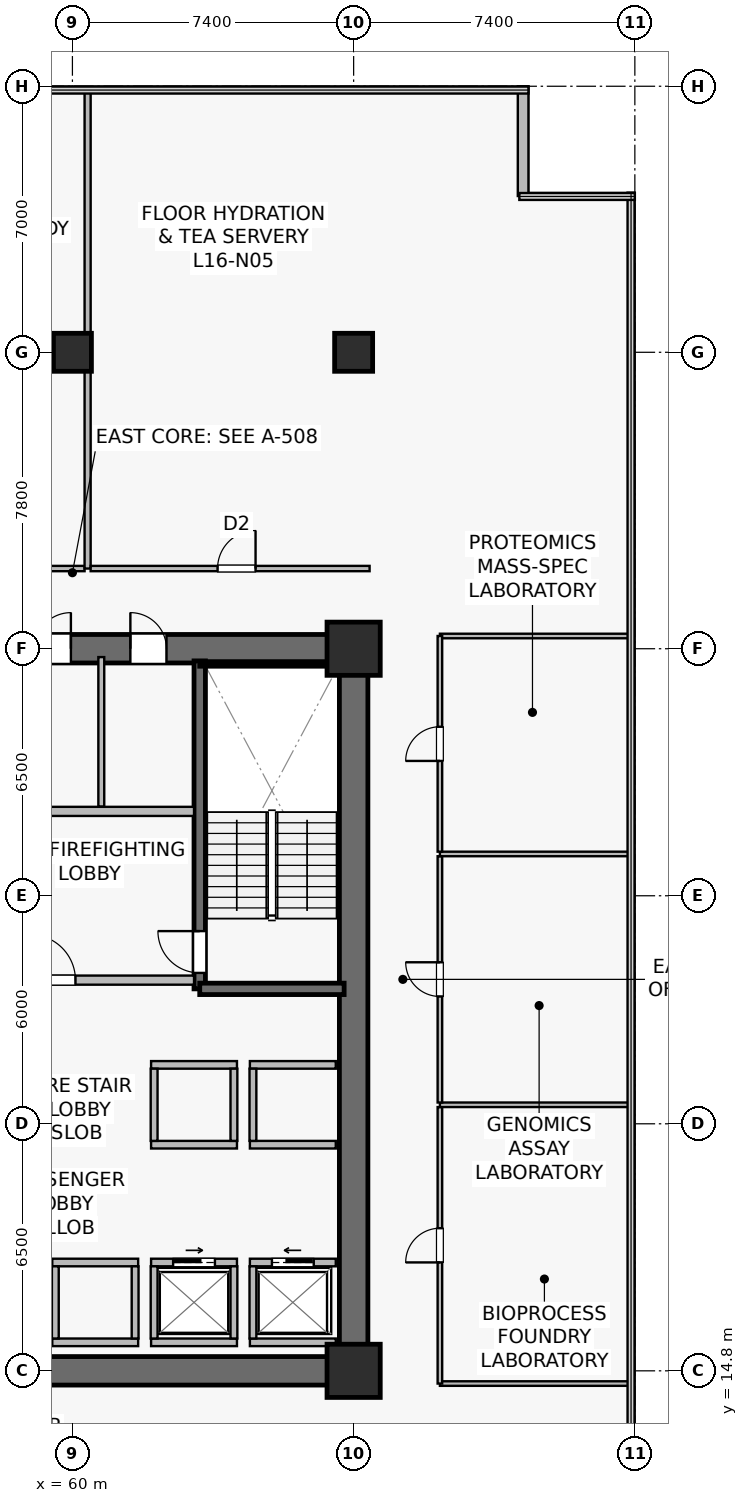
"""IFC4 building model, lengths in metres.
Left out: names, types, materials, properties, quantities, classifications, styles, units other than length and angle.
Written with IfcOpenShell. Run it as: python <this file> out.ifc"""

import sys

from ifc_helpers import new_model, si_unit, direction, frame, frame_2d, origin, origin_2d, place, context, subcontext, project, spatial, rectangle, extrude, source, transform, mapped, element, fill, save


model = new_model("IFC4")
c1 = context("Model", 3, precision=1e-05, world=origin(), true_north=direction((0.0, 1.0)))
c2 = subcontext(c1, "Body", "Model", "MODEL_VIEW")
j1 = project(units=[si_unit("LENGTHUNIT", "METRE"), si_unit("PLANEANGLEUNIT", "RADIAN")], contexts=[c1])
p1 = place(None, origin())
s1 = spatial("IfcSite", under=j1, at=p1, CompositionType="ELEMENT")
p2 = place(p1, origin())
s2 = spatial("IfcBuilding", under=s1, at=p2, CompositionType="ELEMENT")
p3 = place(p2, frame((0.0, 0.0, 66.2)))
s3 = spatial("IfcBuildingStorey", under=s2, at=p3, CompositionType="ELEMENT", Elevation=66.2)
p4 = place(p3, frame((52.225, 14.8, 0.0), z_axis=(0.0, 0.0, 1.0), x_axis=(1.0, 0.0, 0.0)))
e1 = element("IfcWall", 1, at=p4, inside=s3, PredefinedType="SHEAR", context=c2, shape_type="SweptSolid", body=[
    extrude(rectangle(XDim=15.55, YDim=0.75, at=frame_2d((7.775, 0.0))), origin(), (0.0, 0.0, 1.0), 3.78),
])
p5 = place(p3, frame((52.225, 33.8, 0.0), z_axis=(0.0, 0.0, 1.0), x_axis=(1.0, 0.0, 0.0)))
e2 = element("IfcWall", 2, at=p5, inside=s3, PredefinedType="SHEAR", context=c2, shape_type="SweptSolid", body=[
    extrude(rectangle(XDim=15.55, YDim=0.75, at=frame_2d((7.775, 0.0))), origin(), (0.0, 0.0, 1.0), 3.78),
])
p6 = place(p5, frame((9.3, 0.0, 0.0)))
e3 = element("IfcOpeningElement", 3, at=p6, cuts=e2, PredefinedType="OPENING", context=c2, shape_type="SweptSolid", body=[
    extrude(rectangle(XDim=0.95, YDim=2.15, at=frame_2d((0.475, 1.075))), frame((0.0, 0.385, 0.0), z_axis=(0.0, -1.0, 0.0), x_axis=(1.0, 0.0, 0.0)), (0.0, 0.0, 1.0), 0.77),
])
p7 = place(p5, frame((6.785, 0.0, 0.0)))
e4 = element("IfcOpeningElement", 4, at=p7, cuts=e2, PredefinedType="OPENING", context=c2, shape_type="SweptSolid", body=[
    extrude(rectangle(XDim=0.95, YDim=2.15, at=frame_2d((0.475, 1.075))), frame((0.0, 0.385, 0.0), z_axis=(0.0, -1.0, 0.0), x_axis=(1.0, 0.0, 0.0)), (0.0, 0.0, 1.0), 0.77),
])
p8 = place(p5, frame((4.235, 0.0, 0.0)))
e5 = element("IfcOpeningElement", 5, at=p8, cuts=e2, PredefinedType="OPENING", context=c2, shape_type="SweptSolid", body=[
    extrude(rectangle(XDim=0.95, YDim=2.15, at=frame_2d((0.475, 1.075))), frame((0.0, 0.385, 0.0), z_axis=(0.0, -1.0, 0.0), x_axis=(1.0, 0.0, 0.0)), (0.0, 0.0, 1.0), 0.77),
])
p9 = place(p5, frame((1.685, 0.0, 0.0)))
e6 = element("IfcOpeningElement", 6, at=p9, cuts=e2, PredefinedType="OPENING", context=c2, shape_type="SweptSolid", body=[
    extrude(rectangle(XDim=0.95, YDim=2.15, at=frame_2d((0.475, 1.075))), frame((0.0, 0.385, 0.0), z_axis=(0.0, -1.0, 0.0), x_axis=(1.0, 0.0, 0.0)), (0.0, 0.0, 1.0), 0.77),
])
p10 = place(p3, frame((67.4, 15.175, 0.0), z_axis=(0.0, 0.0, 1.0), x_axis=(0.0, 1.0, 0.0)))
e7 = element("IfcWall", 7, at=p10, inside=s3, PredefinedType="SHEAR", context=c2, shape_type="SweptSolid", body=[
    extrude(rectangle(XDim=18.25, YDim=0.75, at=frame_2d((9.125, 0.0))), origin(), (0.0, 0.0, 1.0), 3.78),
])
p11 = place(p3, frame((63.35, 24.85, 0.0), z_axis=(0.0, 0.0, 1.0), x_axis=(0.0, 1.0, 0.0)))
e8 = element("IfcWall", 8, at=p11, inside=s3, PredefinedType="SHEAR", context=c2, shape_type="SweptSolid", body=[
    extrude(rectangle(XDim=8.63, YDim=0.3, at=frame_2d((4.315, 0.0))), origin(), (0.0, 0.0, 1.0), 3.78),
])
p12 = place(p11, frame((0.42, 0.0, 0.0)))
e9 = element("IfcOpeningElement", 9, at=p12, cuts=e8, PredefinedType="OPENING", context=c2, shape_type="SweptSolid", body=[
    extrude(rectangle(XDim=1.1, YDim=2.15, at=frame_2d((0.55, 1.075))), frame((0.0, 0.16, 0.0), z_axis=(0.0, -1.0, 0.0), x_axis=(1.0, 0.0, 0.0)), (0.0, 0.0, 1.0), 0.32),
])
p13 = place(p3, frame((63.35, 24.85, 0.0), z_axis=(0.0, 0.0, 1.0), x_axis=(1.0, 0.0, 0.0)))
e10 = element("IfcWall", 10, at=p13, inside=s3, PredefinedType="SHEAR", context=c2, shape_type="SweptSolid", body=[
    extrude(rectangle(XDim=3.8, YDim=0.3, at=frame_2d((1.9, 0.0))), origin(), (0.0, 0.0, 1.0), 3.78),
])
p14 = place(p3, frame((63.35, 33.4, 0.0), z_axis=(0.0, 0.0, 1.0), x_axis=(1.0, 0.0, 0.0)))
e11 = element("IfcWall", 11, at=p14, inside=s3, PredefinedType="SOLIDWALL", context=c2, shape_type="SweptSolid", body=[
    extrude(rectangle(XDim=3.72, YDim=0.12, at=frame_2d((1.86, 0.0))), origin(), (0.0, 0.0, 1.0), 3.78),
])
m1 = source(origin(), c2, "Body", "SweptSolid", [
    extrude(rectangle(XDim=1.4, YDim=1.4, at=origin_2d()), origin(), (0.0, 0.0, 1.0), 4.1),
])
for number, where, z_axis, x_axis in (
    (12, (67.4, 14.8, 0.0), (0.0, 0.0, 1.0), (1.0, 0.0, 0.0)),
    (13, (67.4, 33.8, 0.0), (0.0, 0.0, 1.0), (1.0, 0.0, 0.0)),
):
    element("IfcColumn", number, at=place(p3, frame(where, z_axis=z_axis, x_axis=x_axis)), inside=s3, PredefinedType="COLUMN", context=c2, shape_type="MappedRepresentation", body=[
        mapped(m1, transform((0.0, 0.0, 0.0), scale=1.0)),
    ])
m2 = source(origin(), c2, "Body", "SweptSolid", [
    extrude(rectangle(XDim=1.0, YDim=1.0, at=origin_2d()), origin(), (0.0, 0.0, 1.0), 4.1),
])
for number, where, z_axis, x_axis in (
    (14, (60.0, 41.6, 0.0), (0.0, 0.0, 1.0), (1.0, 0.0, 0.0)),
    (15, (67.4, 41.6, 0.0), (0.0, 0.0, 1.0), (1.0, 0.0, 0.0)),
):
    element("IfcColumn", number, at=place(p3, frame(where, z_axis=z_axis, x_axis=x_axis)), inside=s3, PredefinedType="COLUMN", context=c2, shape_type="MappedRepresentation", body=[
        mapped(m2, transform((0.0, 0.0, 0.0), scale=1.0)),
    ])
p15 = place(p3, frame((71.86, 45.712, 0.0), z_axis=(0.0, 0.0, 1.0), x_axis=(0.0, 1.0, 0.0)))
e16 = element("IfcWall", 16, at=p15, inside=s3, PredefinedType="STANDARD", context=c2, shape_type="SweptSolid", body=[
    extrude(rectangle(XDim=2.888, YDim=0.28, at=frame_2d((1.444, 0.0))), origin(), (0.0, 0.0, 1.0), 3.78),
])
p16 = place(p3, frame((56.28, 25.08, 0.0), z_axis=(0.0, 0.0, 1.0), x_axis=(1.0, 0.0, 0.0)))
e17 = element("IfcWall", 17, at=p16, inside=s3, PredefinedType="SOLIDWALL", context=c2, shape_type="SweptSolid", body=[
    extrude(rectangle(XDim=6.92, YDim=0.24, at=frame_2d((3.46, 0.0))), origin(), (0.0, 0.0, 1.0), 3.115),
])
p17 = place(p16, frame((2.6, 0.0, 0.0)))
e18 = element("IfcOpeningElement", 18, at=p17, cuts=e17, PredefinedType="OPENING", context=c2, shape_type="SweptSolid", body=[
    extrude(rectangle(XDim=1.2, YDim=2.16, at=frame_2d((0.6, 1.08))), frame((0.0, 0.13, 0.0), z_axis=(0.0, -1.0, 0.0), x_axis=(1.0, 0.0, 0.0)), (0.0, 0.0, 1.0), 0.26),
])
p18 = place(p3, frame((56.28, 29.52, 0.0), z_axis=(0.0, 0.0, 1.0), x_axis=(1.0, 0.0, 0.0)))
e19 = element("IfcWall", 19, at=p18, inside=s3, PredefinedType="SOLIDWALL", context=c2, shape_type="SweptSolid", body=[
    extrude(rectangle(XDim=6.92, YDim=0.24, at=frame_2d((3.46, 0.0))), origin(), (0.0, 0.0, 1.0), 3.115),
])
p19 = place(p3, frame((64.67, 17.65, 0.0), z_axis=(0.0, 0.0, 1.0), x_axis=(1.0, 0.0, 0.0)))
e20 = element("IfcWall", 20, at=p19, inside=s3, PredefinedType="SOLIDWALL", context=c2, shape_type="SweptSolid", body=[
    extrude(rectangle(XDim=2.26, YDim=0.2, at=frame_2d((1.13, 0.0))), origin(), (0.0, 0.0, 1.0), 3.78),
])
p20 = place(p19, frame((0.58, 0.0, 0.0)))
e21 = element("IfcOpeningElement", 21, at=p20, cuts=e20, PredefinedType="OPENING", context=c2, shape_type="SweptSolid", body=[
    extrude(rectangle(XDim=1.1, YDim=2.22, at=frame_2d((0.55, 1.11))), frame((0.0, 0.11, 0.0), z_axis=(0.0, -1.0, 0.0), x_axis=(1.0, 0.0, 0.0)), (0.0, 0.0, 1.0), 0.22),
])
p21 = place(p3, frame((64.67, 15.55, 0.0), z_axis=(0.0, 0.0, 1.0), x_axis=(1.0, 0.0, 0.0)))
e22 = element("IfcWall", 22, at=p21, inside=s3, PredefinedType="SOLIDWALL", context=c2, shape_type="SweptSolid", body=[
    extrude(rectangle(XDim=2.26, YDim=0.2, at=frame_2d((1.13, 0.0))), origin(), (0.0, 0.0, 1.0), 3.78),
])
p22 = place(p3, frame((64.75, 15.65, 0.0), z_axis=(0.0, 0.0, 1.0), x_axis=(0.0, 1.0, 0.0)))
e23 = element("IfcWall", 23, at=p22, inside=s3, PredefinedType="SOLIDWALL", context=c2, shape_type="SweptSolid", body=[
    extrude(rectangle(XDim=1.9, YDim=0.18, at=frame_2d((0.95, 0.0))), origin(), (0.0, 0.0, 1.0), 3.78),
])
p23 = place(p3, frame((62.07, 17.65, 0.0), z_axis=(0.0, 0.0, 1.0), x_axis=(1.0, 0.0, 0.0)))
e24 = element("IfcWall", 24, at=p23, inside=s3, PredefinedType="SOLIDWALL", context=c2, shape_type="SweptSolid", body=[
    extrude(rectangle(XDim=2.26, YDim=0.2, at=frame_2d((1.13, 0.0))), origin(), (0.0, 0.0, 1.0), 3.78),
])
p24 = place(p23, frame((0.58, 0.0, 0.0)))
e25 = element("IfcOpeningElement", 25, at=p24, cuts=e24, PredefinedType="OPENING", context=c2, shape_type="SweptSolid", body=[
    extrude(rectangle(XDim=1.1, YDim=2.22, at=frame_2d((0.55, 1.11))), frame((0.0, 0.11, 0.0), z_axis=(0.0, -1.0, 0.0), x_axis=(1.0, 0.0, 0.0)), (0.0, 0.0, 1.0), 0.22),
])
p25 = place(p3, frame((62.07, 15.55, 0.0), z_axis=(0.0, 0.0, 1.0), x_axis=(1.0, 0.0, 0.0)))
e26 = element("IfcWall", 26, at=p25, inside=s3, PredefinedType="SOLIDWALL", context=c2, shape_type="SweptSolid", body=[
    extrude(rectangle(XDim=2.26, YDim=0.2, at=frame_2d((1.13, 0.0))), origin(), (0.0, 0.0, 1.0), 3.78),
])
for number, where, z_axis, x_axis in (
    (27, (62.15, 15.65, 0.0), (0.0, 0.0, 1.0), (0.0, 1.0, 0.0)),
    (28, (64.25, 15.65, 0.0), (0.0, 0.0, 1.0), (0.0, 1.0, 0.0)),
):
    element("IfcWall", number, at=place(p3, frame(where, z_axis=z_axis, x_axis=x_axis)), inside=s3, PredefinedType="SOLIDWALL", context=c2, shape_type="SweptSolid", body=[
        extrude(rectangle(XDim=1.9, YDim=0.18, at=frame_2d((0.95, 0.0))), origin(), (0.0, 0.0, 1.0), 3.78),
    ])
for number, where, z_axis, x_axis in (
    (29, (59.47, 17.65, 0.0), (0.0, 0.0, 1.0), (1.0, 0.0, 0.0)),
    (30, (59.47, 15.55, 0.0), (0.0, 0.0, 1.0), (1.0, 0.0, 0.0)),
):
    element("IfcWall", number, at=place(p3, frame(where, z_axis=z_axis, x_axis=x_axis)), inside=s3, PredefinedType="SOLIDWALL", context=c2, shape_type="SweptSolid", body=[
        extrude(rectangle(XDim=2.26, YDim=0.2, at=frame_2d((1.13, 0.0))), origin(), (0.0, 0.0, 1.0), 3.115),
    ])
for number, where, z_axis, x_axis in (
    (31, (59.55, 15.65, 0.0), (0.0, 0.0, 1.0), (0.0, 1.0, 0.0)),
    (32, (61.65, 15.65, 0.0), (0.0, 0.0, 1.0), (0.0, 1.0, 0.0)),
):
    element("IfcWall", number, at=place(p3, frame(where, z_axis=z_axis, x_axis=x_axis)), inside=s3, PredefinedType="SOLIDWALL", context=c2, shape_type="SweptSolid", body=[
        extrude(rectangle(XDim=1.9, YDim=0.18, at=frame_2d((0.95, 0.0))), origin(), (0.0, 0.0, 1.0), 3.78),
    ])
for number, where, z_axis, x_axis in (
    (33, (64.67, 20.75, 0.0), (0.0, 0.0, 1.0), (1.0, 0.0, 0.0)),
    (34, (64.67, 22.85, 0.0), (0.0, 0.0, 1.0), (1.0, 0.0, 0.0)),
):
    element("IfcWall", number, at=place(p3, frame(where, z_axis=z_axis, x_axis=x_axis)), inside=s3, PredefinedType="SOLIDWALL", context=c2, shape_type="SweptSolid", body=[
        extrude(rectangle(XDim=2.26, YDim=0.2, at=frame_2d((1.13, 0.0))), origin(), (0.0, 0.0, 1.0), 3.78),
    ])
p26 = place(p3, frame((64.75, 20.85, 0.0), z_axis=(0.0, 0.0, 1.0), x_axis=(0.0, 1.0, 0.0)))
e35 = element("IfcWall", 35, at=p26, inside=s3, PredefinedType="SOLIDWALL", context=c2, shape_type="SweptSolid", body=[
    extrude(rectangle(XDim=1.9, YDim=0.18, at=frame_2d((0.95, 0.0))), origin(), (0.0, 0.0, 1.0), 3.78),
])
for number, where, z_axis, x_axis in (
    (36, (62.07, 20.75, 0.0), (0.0, 0.0, 1.0), (1.0, 0.0, 0.0)),
    (37, (62.07, 22.85, 0.0), (0.0, 0.0, 1.0), (1.0, 0.0, 0.0)),
):
    element("IfcWall", number, at=place(p3, frame(where, z_axis=z_axis, x_axis=x_axis)), inside=s3, PredefinedType="SOLIDWALL", context=c2, shape_type="SweptSolid", body=[
        extrude(rectangle(XDim=2.26, YDim=0.2, at=frame_2d((1.13, 0.0))), origin(), (0.0, 0.0, 1.0), 3.78),
    ])
for number, where, z_axis, x_axis in (
    (38, (62.15, 20.85, 0.0), (0.0, 0.0, 1.0), (0.0, 1.0, 0.0)),
    (39, (64.25, 20.85, 0.0), (0.0, 0.0, 1.0), (0.0, 1.0, 0.0)),
):
    element("IfcWall", number, at=place(p3, frame(where, z_axis=z_axis, x_axis=x_axis)), inside=s3, PredefinedType="SOLIDWALL", context=c2, shape_type="SweptSolid", body=[
        extrude(rectangle(XDim=1.9, YDim=0.18, at=frame_2d((0.95, 0.0))), origin(), (0.0, 0.0, 1.0), 3.78),
    ])
p27 = place(p3, frame((60.76, 29.65, 0.0), z_axis=(0.0, 0.0, 1.0), x_axis=(0.0, 1.0, 0.0)))
e40 = element("IfcWall", 40, at=p27, inside=s3, PredefinedType="PLUMBINGWALL", context=c2, shape_type="SweptSolid", body=[
    extrude(rectangle(XDim=3.93, YDim=0.155, at=frame_2d((1.965, 0.0))), origin(), (0.0, 0.0, 1.0), 3.78),
])
p28 = place(p3, frame((45.08, 35.91, 0.0), z_axis=(0.0, 0.0, 1.0), x_axis=(1.0, 0.0, 0.0)))
e41 = element("IfcWall", 41, at=p28, inside=s3, PredefinedType="PARTITIONING", context=c2, shape_type="SweptSolid", body=[
    extrude(rectangle(XDim=15.24, YDim=0.14, at=frame_2d((7.62, 0.0))), origin(), (0.0, 0.0, 1.0), 3.115),
])
p29 = place(p28, frame((5.86, 0.0, 0.0)))
e42 = element("IfcOpeningElement", 42, at=p29, cuts=e41, PredefinedType="OPENING", context=c2, shape_type="SweptSolid", body=[
    extrude(rectangle(XDim=1.1, YDim=2.18, at=frame_2d((0.55, 1.09))), frame((0.0, 0.08, 0.0), z_axis=(0.0, -1.0, 0.0), x_axis=(1.0, 0.0, 0.0)), (0.0, 0.0, 1.0), 0.16),
])
p30 = place(p3, frame((60.4, 35.91, 0.0), z_axis=(0.0, 0.0, 1.0), x_axis=(0.0, 1.0, 0.0)))
e43 = element("IfcWall", 43, at=p30, inside=s3, PredefinedType="PARTITIONING", context=c2, shape_type="SweptSolid", body=[
    extrude(rectangle(XDim=12.58, YDim=0.16, at=frame_2d((6.29, 0.0))), origin(), (0.0, 0.0, 1.0), 3.015),
])
p31 = place(p3, frame((60.48, 35.91, 0.0), z_axis=(0.0, 0.0, 1.0), x_axis=(1.0, 0.0, 0.0)))
e44 = element("IfcWall", 44, at=p31, inside=s3, PredefinedType="PARTITIONING", context=c2, shape_type="SweptSolid", body=[
    extrude(rectangle(XDim=7.34, YDim=0.14, at=frame_2d((3.67, 0.0))), origin(), (0.0, 0.0, 1.0), 3.265),
])
p32 = place(p31, frame((3.339, 0.0, 0.0)))
e45 = element("IfcOpeningElement", 45, at=p32, cuts=e44, PredefinedType="OPENING", context=c2, shape_type="SweptSolid", body=[
    extrude(rectangle(XDim=1.0, YDim=2.15, at=frame_2d((0.5, 1.075))), frame((0.0, 0.08, 0.0), z_axis=(0.0, -1.0, 0.0), x_axis=(1.0, 0.0, 0.0)), (0.0, 0.0, 1.0), 0.16),
])
for number, where, z_axis, x_axis in (
    (46, (69.67, 14.465, 0.0), (0.0, 0.0, 1.0), (1.0, 0.0, 0.0)),
    (47, (69.67, 34.135, 0.0), (0.0, 0.0, 1.0), (1.0, 0.0, 0.0)),
):
    element("IfcWall", number, at=place(p3, frame(where, z_axis=z_axis, x_axis=x_axis)), inside=s3, PredefinedType="PARTITIONING", context=c2, shape_type="SweptSolid", body=[
        extrude(rectangle(XDim=5.02, YDim=0.12, at=frame_2d((2.51, 0.0))), origin(), (0.0, 0.0, 1.0), 3.78),
    ])
p33 = place(p3, frame((69.67, 14.465, 0.0), z_axis=(0.0, 0.0, 1.0), x_axis=(0.0, 1.0, 0.0)))
e48 = element("IfcWall", 48, at=p33, inside=s3, PredefinedType="PARTITIONING", context=c2, shape_type="SweptSolid", body=[
    extrude(rectangle(XDim=7.275, YDim=0.12, at=frame_2d((3.637, 0.0))), origin(), (0.0, 0.0, 1.0), 3.78),
])
p34 = place(p33, frame((3.188, 0.0, 0.0)))
e49 = element("IfcOpeningElement", 49, at=p34, cuts=e48, PredefinedType="OPENING", context=c2, shape_type="SweptSolid", body=[
    extrude(rectangle(XDim=0.9, YDim=2.1, at=frame_2d((0.45, 1.05))), frame((0.0, 0.07, 0.0), z_axis=(0.0, -1.0, 0.0), x_axis=(1.0, 0.0, 0.0)), (0.0, 0.0, 1.0), 0.14),
])
p35 = place(p3, frame((69.67, 21.8, 0.0), z_axis=(0.0, 0.0, 1.0), x_axis=(1.0, 0.0, 0.0)))
e50 = element("IfcWall", 50, at=p35, inside=s3, PredefinedType="PARTITIONING", context=c2, shape_type="SweptSolid", body=[
    extrude(rectangle(XDim=5.02, YDim=0.12, at=frame_2d((2.51, 0.0))), origin(), (0.0, 0.0, 1.0), 3.78),
])
p36 = place(p3, frame((69.67, 21.86, 0.0), z_axis=(0.0, 0.0, 1.0), x_axis=(0.0, 1.0, 0.0)))
e51 = element("IfcWall", 51, at=p36, inside=s3, PredefinedType="PARTITIONING", context=c2, shape_type="SweptSolid", body=[
    extrude(rectangle(XDim=6.48, YDim=0.12, at=frame_2d((3.24, 0.0))), origin(), (0.0, 0.0, 1.0), 3.78),
])
p37 = place(p36, frame((2.79, 0.0, 0.0)))
e52 = element("IfcOpeningElement", 52, at=p37, cuts=e51, PredefinedType="OPENING", context=c2, shape_type="SweptSolid", body=[
    extrude(rectangle(XDim=0.9, YDim=2.1, at=frame_2d((0.45, 1.05))), frame((0.0, 0.07, 0.0), z_axis=(0.0, -1.0, 0.0), x_axis=(1.0, 0.0, 0.0)), (0.0, 0.0, 1.0), 0.14),
])
p38 = place(p3, frame((69.67, 28.4, 0.0), z_axis=(0.0, 0.0, 1.0), x_axis=(1.0, 0.0, 0.0)))
e53 = element("IfcWall", 53, at=p38, inside=s3, PredefinedType="PARTITIONING", context=c2, shape_type="SweptSolid", body=[
    extrude(rectangle(XDim=5.02, YDim=0.12, at=frame_2d((2.51, 0.0))), origin(), (0.0, 0.0, 1.0), 3.78),
])
p39 = place(p3, frame((69.67, 28.46, 0.0), z_axis=(0.0, 0.0, 1.0), x_axis=(0.0, 1.0, 0.0)))
e54 = element("IfcWall", 54, at=p39, inside=s3, PredefinedType="PARTITIONING", context=c2, shape_type="SweptSolid", body=[
    extrude(rectangle(XDim=5.675, YDim=0.12, at=frame_2d((2.837, 0.0))), origin(), (0.0, 0.0, 1.0), 3.78),
])
p40 = place(p39, frame((2.387, 0.0, 0.0)))
e55 = element("IfcOpeningElement", 55, at=p40, cuts=e54, PredefinedType="OPENING", context=c2, shape_type="SweptSolid", body=[
    extrude(rectangle(XDim=0.9, YDim=2.1, at=frame_2d((0.45, 1.05))), frame((0.0, 0.07, 0.0), z_axis=(0.0, -1.0, 0.0), x_axis=(1.0, 0.0, 0.0)), (0.0, 0.0, 1.0), 0.14),
])
m3 = source(origin(), c2, "Body", "SweptSolid", [
    extrude(rectangle(XDim=1.1, YDim=2.15, at=frame_2d((0.55, 1.075))), frame((0.0, 0.025, 0.0), z_axis=(0.0, -1.0, 0.0), x_axis=(1.0, 0.0, 0.0)), (0.0, 0.0, 1.0), 0.05),
])
p41 = place(p12, origin())
e56 = element("IfcDoor", 56, at=p41, inside=s3, OperationType="SINGLE_SWING_RIGHT", PredefinedType="DOOR", context=c2, shape_type="MappedRepresentation", body=[
    mapped(m3, transform((0.0, 0.0, 0.0), scale=1.0)),
])
fill(e9, e56)
m4 = source(origin(), c2, "Body", "SweptSolid", [
    extrude(rectangle(XDim=1.2, YDim=2.16, at=frame_2d((0.6, 1.08))), frame((0.0, 0.025, 0.0), z_axis=(0.0, -1.0, 0.0), x_axis=(1.0, 0.0, 0.0)), (0.0, 0.0, 1.0), 0.05),
])
p42 = place(p17, origin())
e57 = element("IfcDoor", 57, at=p42, inside=s3, OperationType="SINGLE_SWING_LEFT", PredefinedType="DOOR", context=c2, shape_type="MappedRepresentation", body=[
    mapped(m4, transform((0.0, 0.0, 0.0), scale=1.0)),
])
fill(e18, e57)
m5 = source(origin(), c2, "Body", "SweptSolid", [
    extrude(rectangle(XDim=1.1, YDim=2.22, at=frame_2d((0.55, 1.11))), frame((0.0, 0.025, 0.0), z_axis=(0.0, -1.0, 0.0), x_axis=(1.0, 0.0, 0.0)), (0.0, 0.0, 1.0), 0.05),
])
p43 = place(p20, origin())
e58 = element("IfcDoor", 58, at=p43, inside=s3, OperationType="SLIDING_TO_LEFT", PredefinedType="USERDEFINED", context=c2, shape_type="MappedRepresentation", body=[
    mapped(m5, transform((0.0, 0.0, 0.0), scale=1.0)),
])
fill(e21, e58)
p44 = place(p24, origin())
e59 = element("IfcDoor", 59, at=p44, inside=s3, OperationType="SLIDING_TO_RIGHT", PredefinedType="USERDEFINED", context=c2, shape_type="MappedRepresentation", body=[
    mapped(m5, transform((0.0, 0.0, 0.0), scale=1.0)),
])
fill(e25, e59)
m6 = source(origin(), c2, "Body", "SweptSolid", [
    extrude(rectangle(XDim=0.95, YDim=2.15, at=frame_2d((0.475, 1.075))), frame((0.0, 0.025, 0.0), z_axis=(0.0, -1.0, 0.0), x_axis=(1.0, 0.0, 0.0)), (0.0, 0.0, 1.0), 0.05),
])
p45 = place(p6, origin())
e60 = element("IfcDoor", 60, at=p45, inside=s3, OperationType="SINGLE_SWING_LEFT", PredefinedType="DOOR", context=c2, shape_type="MappedRepresentation", body=[
    mapped(m6, transform((0.0, 0.0, 0.0), scale=1.0)),
])
fill(e3, e60)
p46 = place(p7, origin())
e61 = element("IfcDoor", 61, at=p46, inside=s3, OperationType="SINGLE_SWING_RIGHT", PredefinedType="DOOR", context=c2, shape_type="MappedRepresentation", body=[
    mapped(m6, transform((0.0, 0.0, 0.0), scale=1.0)),
])
fill(e4, e61)
m7 = source(origin(), c2, "Body", "SweptSolid", [
    extrude(rectangle(XDim=1.0, YDim=2.15, at=frame_2d((0.5, 1.075))), frame((0.0, 0.025, 0.0), z_axis=(0.0, -1.0, 0.0), x_axis=(1.0, 0.0, 0.0)), (0.0, 0.0, 1.0), 0.05),
])
p47 = place(p32, origin())
e62 = element("IfcDoor", 62, at=p47, inside=s3, OperationType="SINGLE_SWING_RIGHT", PredefinedType="DOOR", context=c2, shape_type="MappedRepresentation", body=[
    mapped(m7, transform((0.0, 0.0, 0.0), scale=1.0)),
])
fill(e45, e62)
m8 = source(origin(), c2, "Body", "SweptSolid", [
    extrude(rectangle(XDim=0.9, YDim=2.1, at=frame_2d((0.45, 1.05))), frame((0.0, 0.025, 0.0), z_axis=(0.0, -1.0, 0.0), x_axis=(1.0, 0.0, 0.0)), (0.0, 0.0, 1.0), 0.05),
])
p48 = place(p34, origin())
e63 = element("IfcDoor", 63, at=p48, inside=s3, OperationType="SINGLE_SWING_LEFT", PredefinedType="DOOR", context=c2, shape_type="MappedRepresentation", body=[
    mapped(m8, transform((0.0, 0.0, 0.0), scale=1.0)),
])
fill(e49, e63)
p49 = place(p37, origin())
e64 = element("IfcDoor", 64, at=p49, inside=s3, OperationType="SINGLE_SWING_RIGHT", PredefinedType="DOOR", context=c2, shape_type="MappedRepresentation", body=[
    mapped(m8, transform((0.0, 0.0, 0.0), scale=1.0)),
])
fill(e52, e64)
p50 = place(p40, origin())
e65 = element("IfcDoor", 65, at=p50, inside=s3, OperationType="SINGLE_SWING_LEFT", PredefinedType="DOOR", context=c2, shape_type="MappedRepresentation", body=[
    mapped(m8, transform((0.0, 0.0, 0.0), scale=1.0)),
])
fill(e55, e65)
save(model, sys.argv[1])
